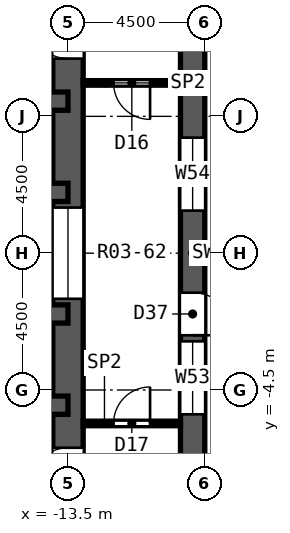
"""IFC4 building model, lengths in metres.
Left out: names, types, materials, properties, quantities, classifications, styles, units other than length and angle.
Written with IfcOpenShell. Run it as: python <this file> out.ifc"""

import sys

from ifc_helpers import new_model, si_unit, direction, frame, frame_2d, origin, place, context, subcontext, project, spatial, rectangle, extrude, element, fill, save


model = new_model("IFC4")
c1 = context("Model", 3, precision=1e-05, world=origin(), true_north=direction((0.0, 1.0)))
c2 = subcontext(c1, "Body", "Model", "MODEL_VIEW")
j1 = project(units=[si_unit("LENGTHUNIT", "METRE"), si_unit("PLANEANGLEUNIT", "RADIAN")], contexts=[c1])
p1 = place(None, origin())
s1 = spatial("IfcSite", under=j1, at=p1, CompositionType="ELEMENT")
p2 = place(p1, origin())
s2 = spatial("IfcBuilding", under=s1, at=p2, CompositionType="ELEMENT")
p3 = place(p2, origin())
s3 = spatial("IfcBuildingStorey", under=s2, at=p3, CompositionType="ELEMENT", Elevation=0.0)
p4 = place(p3, frame((-13.5, -9.0, 0.0), z_axis=(0.0, 0.0, 1.0), x_axis=(0.0, 1.0, 0.0)))
e1 = element("IfcWall", 1, at=p4, inside=s3, PredefinedType="SHEAR", context=c2, shape_type="SweptSolid", body=[
    extrude(rectangle(XDim=18.0, YDim=1.0, at=frame_2d((9.0, 0.0))), origin(), (0.0, 0.0, 1.0), 5.0),
])
p5 = place(p4, frame((15.4, 0.0, 0.0)))
e2 = element("IfcOpeningElement", 2, at=p5, cuts=e1, PredefinedType="OPENING", context=c2, shape_type="SweptSolid", body=[
    extrude(rectangle(XDim=1.2, YDim=2.1, at=frame_2d((0.6, 1.05))), frame((0.0, 0.512, 0.0), z_axis=(0.0, -1.0, 0.0), x_axis=(1.0, 0.0, 0.0)), (0.0, 0.0, 1.0), 1.024),
])
p6 = place(p4, frame((1.4, 0.0, 0.0)))
e3 = element("IfcOpeningElement", 3, at=p6, cuts=e1, PredefinedType="OPENING", context=c2, shape_type="SweptSolid", body=[
    extrude(rectangle(XDim=1.2, YDim=2.1, at=frame_2d((0.6, 1.05))), frame((0.0, 0.512, 0.0), z_axis=(0.0, -1.0, 0.0), x_axis=(1.0, 0.0, 0.0)), (0.0, 0.0, 1.0), 1.024),
])
p7 = place(p4, frame((7.5, 0.0, 0.0)))
e4 = element("IfcOpeningElement", 4, at=p7, cuts=e1, PredefinedType="OPENING", context=c2, shape_type="SweptSolid", body=[
    extrude(rectangle(XDim=3.0, YDim=2.4, at=frame_2d((1.5, 1.2))), frame((0.0, 0.512, 0.0), z_axis=(0.0, -1.0, 0.0), x_axis=(1.0, 0.0, 0.0)), (0.0, 0.0, 1.0), 1.024),
])
p8 = place(p3, frame((-13.5, 5.0, 0.0), z_axis=(0.0, 0.0, 1.0), x_axis=(-1.0, 0.0, 0.0)))
e5 = element("IfcWall", 5, at=p8, inside=s3, PredefinedType="SHEAR", context=c2, shape_type="SweptSolid", body=[
    extrude(rectangle(XDim=12.4, YDim=0.6, at=frame_2d((6.2, 0.0))), origin(), (0.0, 0.0, 1.0), 5.0),
])
p9 = place(p8, frame((9.74, 0.0, 0.0)))
e6 = element("IfcOpeningElement", 6, at=p9, cuts=e5, PredefinedType="OPENING", context=c2, shape_type="SweptSolid", body=[
    extrude(rectangle(XDim=0.9, YDim=2.1, at=frame_2d((0.45, 1.05))), frame((0.0, 0.312, 0.0), z_axis=(0.0, -1.0, 0.0), x_axis=(1.0, 0.0, 0.0)), (0.0, 0.0, 1.0), 0.624),
])
p10 = place(p3, frame((-13.5, -5.0, 0.0), z_axis=(0.0, 0.0, 1.0), x_axis=(-1.0, 0.0, 0.0)))
e7 = element("IfcWall", 7, at=p10, inside=s3, PredefinedType="SHEAR", context=c2, shape_type="SweptSolid", body=[
    extrude(rectangle(XDim=12.4, YDim=0.6, at=frame_2d((6.2, 0.0))), origin(), (0.0, 0.0, 1.0), 5.0),
])
p11 = place(p10, frame((9.74, 0.0, 0.0)))
e8 = element("IfcOpeningElement", 8, at=p11, cuts=e7, PredefinedType="OPENING", context=c2, shape_type="SweptSolid", body=[
    extrude(rectangle(XDim=0.9, YDim=2.1, at=frame_2d((0.45, 1.05))), frame((0.0, 0.312, 0.0), z_axis=(0.0, -1.0, 0.0), x_axis=(1.0, 0.0, 0.0)), (0.0, 0.0, 1.0), 0.624),
])
p12 = place(p10, frame((0.6, 0.0, 0.0)))
e9 = element("IfcOpeningElement", 9, at=p12, cuts=e7, PredefinedType="OPENING", context=c2, shape_type="SweptSolid", body=[
    extrude(rectangle(XDim=1.1, YDim=2.1, at=frame_2d((0.55, 1.05))), frame((0.0, 0.312, 0.0), z_axis=(0.0, -1.0, 0.0), x_axis=(1.0, 0.0, 0.0)), (0.0, 0.0, 1.0), 0.624),
])
p13 = place(p3, frame((-13.5, 2.0, 0.0), z_axis=(0.0, 0.0, 1.0), x_axis=(-1.0, 0.0, 0.0)))
e10 = element("IfcWall", 10, at=p13, inside=s3, PredefinedType="SHEAR", context=c2, shape_type="SweptSolid", body=[
    extrude(rectangle(XDim=12.4, YDim=0.6, at=frame_2d((6.2, 0.0))), origin(), (0.0, 0.0, 1.0), 5.0),
])
p14 = place(p13, frame((7.65, 0.0, 0.0)))
e11 = element("IfcOpeningElement", 11, at=p14, cuts=e10, PredefinedType="OPENING", context=c2, shape_type="SweptSolid", body=[
    extrude(rectangle(XDim=1.1, YDim=2.1, at=frame_2d((0.55, 1.05))), frame((0.0, 0.312, 0.0), z_axis=(0.0, -1.0, 0.0), x_axis=(1.0, 0.0, 0.0)), (0.0, 0.0, 1.0), 0.624),
])
p15 = place(p13, frame((2.341, 0.0, 0.0)))
e12 = element("IfcOpeningElement", 12, at=p15, cuts=e10, PredefinedType="OPENING", context=c2, shape_type="SweptSolid", body=[
    extrude(rectangle(XDim=0.9, YDim=2.1, at=frame_2d((0.45, 1.05))), frame((0.0, 0.312, 0.0), z_axis=(0.0, -1.0, 0.0), x_axis=(1.0, 0.0, 0.0)), (0.0, 0.0, 1.0), 0.624),
])
p16 = place(p13, frame((5.761, 0.0, 0.0)))
e13 = element("IfcOpeningElement", 13, at=p16, cuts=e10, PredefinedType="OPENING", context=c2, shape_type="SweptSolid", body=[
    extrude(rectangle(XDim=0.9, YDim=2.1, at=frame_2d((0.45, 1.05))), frame((0.0, 0.312, 0.0), z_axis=(0.0, -1.0, 0.0), x_axis=(1.0, 0.0, 0.0)), (0.0, 0.0, 1.0), 0.624),
])
p17 = place(p13, frame((9.74, 0.0, 0.0)))
e14 = element("IfcOpeningElement", 14, at=p17, cuts=e10, PredefinedType="OPENING", context=c2, shape_type="SweptSolid", body=[
    extrude(rectangle(XDim=0.9, YDim=2.1, at=frame_2d((0.45, 1.05))), frame((0.0, 0.312, 0.0), z_axis=(0.0, -1.0, 0.0), x_axis=(1.0, 0.0, 0.0)), (0.0, 0.0, 1.0), 0.624),
])
p18 = place(p13, frame((10.88, 0.0, 0.0)))
e15 = element("IfcOpeningElement", 15, at=p18, cuts=e10, PredefinedType="OPENING", context=c2, shape_type="SweptSolid", body=[
    extrude(rectangle(XDim=0.9, YDim=2.1, at=frame_2d((0.45, 1.05))), frame((0.0, 0.312, 0.0), z_axis=(0.0, -1.0, 0.0), x_axis=(1.0, 0.0, 0.0)), (0.0, 0.0, 1.0), 0.624),
])
p19 = place(p3, frame((-13.5, -2.0, 0.0), z_axis=(0.0, 0.0, 1.0), x_axis=(-1.0, 0.0, 0.0)))
e16 = element("IfcWall", 16, at=p19, inside=s3, PredefinedType="SHEAR", context=c2, shape_type="SweptSolid", body=[
    extrude(rectangle(XDim=12.4, YDim=0.6, at=frame_2d((6.2, 0.0))), origin(), (0.0, 0.0, 1.0), 5.0),
])
p20 = place(p19, frame((5.62, 0.0, 0.0)))
e17 = element("IfcOpeningElement", 17, at=p20, cuts=e16, PredefinedType="OPENING", context=c2, shape_type="SweptSolid", body=[
    extrude(rectangle(XDim=1.1, YDim=2.1, at=frame_2d((0.55, 1.05))), frame((0.0, 0.312, 0.0), z_axis=(0.0, -1.0, 0.0), x_axis=(1.0, 0.0, 0.0)), (0.0, 0.0, 1.0), 0.624),
])
p21 = place(p19, frame((7.65, 0.0, 0.0)))
e18 = element("IfcOpeningElement", 18, at=p21, cuts=e16, PredefinedType="OPENING", context=c2, shape_type="SweptSolid", body=[
    extrude(rectangle(XDim=1.1, YDim=2.1, at=frame_2d((0.55, 1.05))), frame((0.0, 0.312, 0.0), z_axis=(0.0, -1.0, 0.0), x_axis=(1.0, 0.0, 0.0)), (0.0, 0.0, 1.0), 0.624),
])
p22 = place(p19, frame((1.265, 0.0, 0.0)))
e19 = element("IfcOpeningElement", 19, at=p22, cuts=e16, PredefinedType="OPENING", context=c2, shape_type="SweptSolid", body=[
    extrude(rectangle(XDim=1.0, YDim=2.1, at=frame_2d((0.5, 1.05))), frame((0.0, 0.312, 0.0), z_axis=(0.0, -1.0, 0.0), x_axis=(1.0, 0.0, 0.0)), (0.0, 0.0, 1.0), 0.624),
])
p23 = place(p19, frame((9.74, 0.0, 0.0)))
e20 = element("IfcOpeningElement", 20, at=p23, cuts=e16, PredefinedType="OPENING", context=c2, shape_type="SweptSolid", body=[
    extrude(rectangle(XDim=0.9, YDim=2.1, at=frame_2d((0.45, 1.05))), frame((0.0, 0.312, 0.0), z_axis=(0.0, -1.0, 0.0), x_axis=(1.0, 0.0, 0.0)), (0.0, 0.0, 1.0), 0.624),
])
p24 = place(p19, frame((10.88, 0.0, 0.0)))
e21 = element("IfcOpeningElement", 21, at=p24, cuts=e16, PredefinedType="OPENING", context=c2, shape_type="SweptSolid", body=[
    extrude(rectangle(XDim=0.9, YDim=2.1, at=frame_2d((0.45, 1.05))), frame((0.0, 0.312, 0.0), z_axis=(0.0, -1.0, 0.0), x_axis=(1.0, 0.0, 0.0)), (0.0, 0.0, 1.0), 0.624),
])
p25 = place(p3, frame((-9.4, -27.077, 0.0), z_axis=(0.0, 0.0, 1.0), x_axis=(0.0, 1.0, 0.0)))
e22 = element("IfcWall", 22, at=p25, inside=s3, PredefinedType="SHEAR", context=c2, shape_type="SweptSolid", body=[
    extrude(rectangle(XDim=54.154, YDim=0.8, at=frame_2d((27.077, 0.0))), origin(), (0.0, 0.0, 1.0), 5.0),
])
p26 = place(p25, frame((17.377, 0.0, 0.0)))
e23 = element("IfcOpeningElement", 23, at=p26, cuts=e22, PredefinedType="OPENING", context=c2, shape_type="SweptSolid", body=[
    extrude(rectangle(XDim=1.4, YDim=2.1, at=frame_2d((0.7, 1.05))), frame((0.0, 0.412, 0.0), z_axis=(0.0, -1.0, 0.0), x_axis=(1.0, 0.0, 0.0)), (0.0, 0.0, 1.0), 0.824),
])
p27 = place(p25, frame((21.777, 0.0, 0.3)))
e24 = element("IfcOpeningElement", 24, at=p27, cuts=e22, PredefinedType="OPENING", context=c2, shape_type="SweptSolid", body=[
    extrude(rectangle(XDim=2.4, YDim=2.1, at=frame_2d((1.2, 1.05))), frame((0.0, 0.412, 0.0), z_axis=(0.0, -1.0, 0.0), x_axis=(1.0, 0.0, 0.0)), (0.0, 0.0, 1.0), 0.824),
])
p28 = place(p25, frame((24.377, 0.0, 0.0)))
e25 = element("IfcOpeningElement", 25, at=p28, cuts=e22, PredefinedType="OPENING", context=c2, shape_type="SweptSolid", body=[
    extrude(rectangle(XDim=1.4, YDim=2.1, at=frame_2d((0.7, 1.05))), frame((0.0, 0.412, 0.0), z_axis=(0.0, -1.0, 0.0), x_axis=(1.0, 0.0, 0.0)), (0.0, 0.0, 1.0), 0.824),
])
p29 = place(p25, frame((28.477, 0.0, 0.3)))
e26 = element("IfcOpeningElement", 26, at=p29, cuts=e22, PredefinedType="OPENING", context=c2, shape_type="SweptSolid", body=[
    extrude(rectangle(XDim=2.4, YDim=2.1, at=frame_2d((1.2, 1.05))), frame((0.0, 0.412, 0.0), z_axis=(0.0, -1.0, 0.0), x_axis=(1.0, 0.0, 0.0)), (0.0, 0.0, 1.0), 0.824),
])
p30 = place(p25, frame((33.877, 0.0, 0.0)))
e27 = element("IfcOpeningElement", 27, at=p30, cuts=e22, PredefinedType="OPENING", context=c2, shape_type="SweptSolid", body=[
    extrude(rectangle(XDim=1.4, YDim=2.1, at=frame_2d((0.7, 1.05))), frame((0.0, 0.412, 0.0), z_axis=(0.0, -1.0, 0.0), x_axis=(1.0, 0.0, 0.0)), (0.0, 0.0, 1.0), 0.824),
])
p31 = place(p25, frame((37.877, 0.0, 0.3)))
e28 = element("IfcOpeningElement", 28, at=p31, cuts=e22, PredefinedType="OPENING", context=c2, shape_type="SweptSolid", body=[
    extrude(rectangle(XDim=2.4, YDim=2.1, at=frame_2d((1.2, 1.05))), frame((0.0, 0.412, 0.0), z_axis=(0.0, -1.0, 0.0), x_axis=(1.0, 0.0, 0.0)), (0.0, 0.0, 1.0), 0.824),
])
p32 = place(p3, frame((-13.0, -5.6, 0.0), z_axis=(0.0, 0.0, 1.0), x_axis=(1.0, 0.0, 0.0)))
e29 = element("IfcWall", 29, at=p32, inside=s3, PredefinedType="PARTITIONING", context=c2, shape_type="SweptSolid", body=[
    extrude(rectangle(XDim=3.2, YDim=0.15, at=frame_2d((1.6, 0.0))), origin(), (0.0, 0.0, 1.0), 4.45),
])
p33 = place(p32, frame((1.0, 0.0, 0.0)))
e30 = element("IfcOpeningElement", 30, at=p33, cuts=e29, PredefinedType="OPENING", context=c2, shape_type="SweptSolid", body=[
    extrude(rectangle(XDim=1.2, YDim=2.1, at=frame_2d((0.6, 1.05))), frame((0.0, 0.087, 0.0), z_axis=(0.0, -1.0, 0.0), x_axis=(1.0, 0.0, 0.0)), (0.0, 0.0, 1.0), 0.174),
])
p34 = place(p3, frame((-13.0, 5.6, 0.0), z_axis=(0.0, 0.0, 1.0), x_axis=(1.0, 0.0, 0.0)))
e31 = element("IfcWall", 31, at=p34, inside=s3, PredefinedType="PARTITIONING", context=c2, shape_type="SweptSolid", body=[
    extrude(rectangle(XDim=3.2, YDim=0.15, at=frame_2d((1.6, 0.0))), origin(), (0.0, 0.0, 1.0), 4.45),
])
p35 = place(p34, frame((1.0, 0.0, 0.0)))
e32 = element("IfcOpeningElement", 32, at=p35, cuts=e31, PredefinedType="OPENING", context=c2, shape_type="SweptSolid", body=[
    extrude(rectangle(XDim=1.2, YDim=2.1, at=frame_2d((0.6, 1.05))), frame((0.0, 0.087, 0.0), z_axis=(0.0, -1.0, 0.0), x_axis=(1.0, 0.0, 0.0)), (0.0, 0.0, 1.0), 0.174),
])
p36 = place(p35, frame((1.2, 0.0, 0.0), z_axis=(0.0, 0.0, 1.0), x_axis=(-1.0, 0.0, 0.0)))
e33 = element("IfcDoor", 33, at=p36, inside=s3, OperationType="SINGLE_SWING_LEFT", PredefinedType="DOOR", context=c2, shape_type="SweptSolid", body=[
    extrude(rectangle(XDim=1.2, YDim=2.1, at=frame_2d((0.6, 1.05))), frame((0.0, 0.025, 0.0), z_axis=(0.0, -1.0, 0.0), x_axis=(1.0, 0.0, 0.0)), (0.0, 0.0, 1.0), 0.05),
])
fill(e32, e33)
p37 = place(p33, origin())
e34 = element("IfcDoor", 34, at=p37, inside=s3, OperationType="SINGLE_SWING_RIGHT", PredefinedType="DOOR", context=c2, shape_type="SweptSolid", body=[
    extrude(rectangle(XDim=1.2, YDim=2.1, at=frame_2d((0.6, 1.05))), frame((0.0, 0.025, 0.0), z_axis=(0.0, -1.0, 0.0), x_axis=(1.0, 0.0, 0.0)), (0.0, 0.0, 1.0), 0.05),
])
fill(e30, e34)
p38 = place(p27, origin())
e35 = element("IfcWindow", 35, at=p38, inside=s3, PartitioningType="SINGLE_PANEL", PredefinedType="WINDOW", context=c2, shape_type="SweptSolid", body=[
    extrude(rectangle(XDim=2.4, YDim=2.1, at=frame_2d((1.2, 1.05))), frame((0.0, 0.03, 0.0), z_axis=(0.0, -1.0, 0.0), x_axis=(1.0, 0.0, 0.0)), (0.0, 0.0, 1.0), 0.06),
])
fill(e24, e35)
p39 = place(p28, frame((1.4, 0.0, 0.0), z_axis=(0.0, 0.0, 1.0), x_axis=(-1.0, 0.0, 0.0)))
e36 = element("IfcDoor", 36, at=p39, inside=s3, OperationType="SINGLE_SWING_RIGHT", PredefinedType="DOOR", context=c2, shape_type="SweptSolid", body=[
    extrude(rectangle(XDim=1.4, YDim=2.1, at=frame_2d((0.7, 1.05))), frame((0.0, 0.025, 0.0), z_axis=(0.0, -1.0, 0.0), x_axis=(1.0, 0.0, 0.0)), (0.0, 0.0, 1.0), 0.05),
])
fill(e25, e36)
p40 = place(p29, origin())
e37 = element("IfcWindow", 37, at=p40, inside=s3, PartitioningType="SINGLE_PANEL", PredefinedType="WINDOW", context=c2, shape_type="SweptSolid", body=[
    extrude(rectangle(XDim=2.4, YDim=2.1, at=frame_2d((1.2, 1.05))), frame((0.0, 0.03, 0.0), z_axis=(0.0, -1.0, 0.0), x_axis=(1.0, 0.0, 0.0)), (0.0, 0.0, 1.0), 0.06),
])
fill(e26, e37)
p41 = place(p5, origin())
e38 = element("IfcDoor", 38, at=p41, inside=s3, OperationType="SINGLE_SWING_RIGHT", PredefinedType="DOOR", context=c2, shape_type="SweptSolid", body=[
    extrude(rectangle(XDim=1.2, YDim=2.1, at=frame_2d((0.6, 1.05))), frame((0.0, 0.025, 0.0), z_axis=(0.0, -1.0, 0.0), x_axis=(1.0, 0.0, 0.0)), (0.0, 0.0, 1.0), 0.05),
])
fill(e2, e38)
p42 = place(p6, origin())
e39 = element("IfcDoor", 39, at=p42, inside=s3, OperationType="SINGLE_SWING_LEFT", PredefinedType="DOOR", context=c2, shape_type="SweptSolid", body=[
    extrude(rectangle(XDim=1.2, YDim=2.1, at=frame_2d((0.6, 1.05))), frame((0.0, 0.025, 0.0), z_axis=(0.0, -1.0, 0.0), x_axis=(1.0, 0.0, 0.0)), (0.0, 0.0, 1.0), 0.05),
])
fill(e3, e39)
p43 = place(p7, origin())
e40 = element("IfcDoor", 40, at=p43, inside=s3, OperationType="DOUBLE_DOOR_SLIDING", PredefinedType="DOOR", context=c2, shape_type="SweptSolid", body=[
    extrude(rectangle(XDim=3.0, YDim=2.4, at=frame_2d((1.5, 1.2))), frame((0.0, 0.025, 0.0), z_axis=(0.0, -1.0, 0.0), x_axis=(1.0, 0.0, 0.0)), (0.0, 0.0, 1.0), 0.05),
])
fill(e4, e40)
save(model, sys.argv[1])
